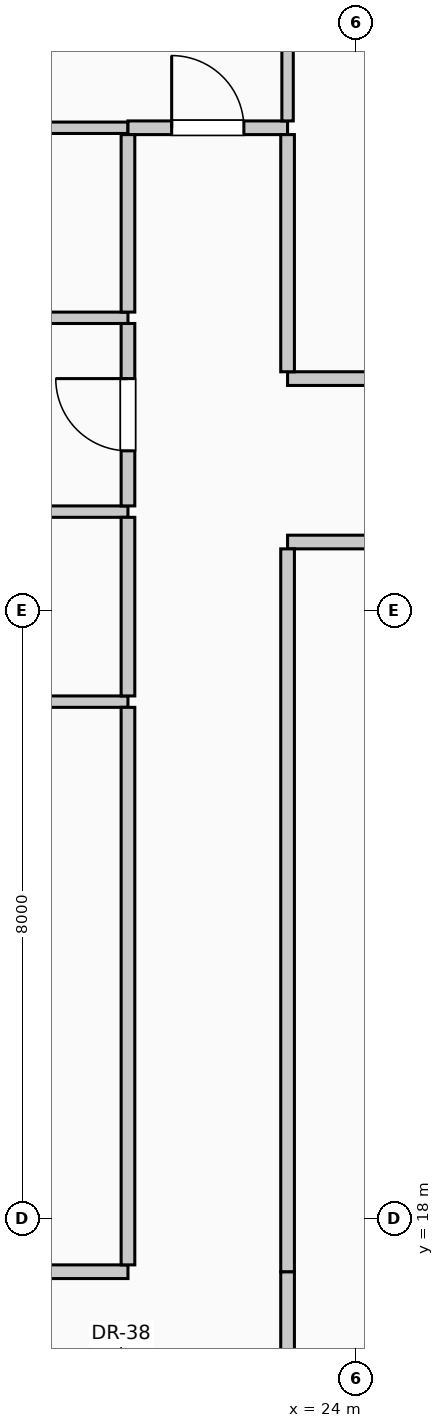
"""IFC4 building model, lengths in metres.
Left out: names, types, materials, properties, quantities, classifications, styles, units other than length and angle.
Written with IfcOpenShell. Run it as: python <this file> out.ifc"""

import sys

from ifc_helpers import new_model, si_unit, direction, frame, frame_2d, origin, place, context, subcontext, project, spatial, rectangle, extrude, element, fill, save


model = new_model("IFC4")
c1 = context("Model", 3, precision=1e-05, world=origin(), true_north=direction((0.0, 1.0)))
c2 = subcontext(c1, "Body", "Model", "MODEL_VIEW")
j1 = project(units=[si_unit("LENGTHUNIT", "METRE"), si_unit("PLANEANGLEUNIT", "RADIAN")], contexts=[c1])
p1 = place(None, origin())
s1 = spatial("IfcSite", under=j1, at=p1, CompositionType="ELEMENT")
p2 = place(p1, origin())
s2 = spatial("IfcBuilding", under=s1, at=p2, CompositionType="ELEMENT")
p3 = place(p2, frame((0.0, 0.0, 248.6)))
s3 = spatial("IfcBuildingStorey", under=s2, at=p3, CompositionType="ELEMENT", Elevation=248.6)
p4 = place(p3, frame((15.85, 17.3, 0.0), z_axis=(0.0, 0.0, 1.0), x_axis=(1.0, 0.0, 0.0)))
e1 = element("IfcWall", 1, at=p4, inside=s3, PredefinedType="PARTITIONING", context=c2, shape_type="SweptSolid", body=[
    extrude(rectangle(XDim=5.15, YDim=0.18, at=frame_2d((2.575, 0.0))), origin(), (0.0, 0.0, 1.0), 3.75),
])
p5 = place(p4, frame((2.28, 0.0, 0.0)))
e2 = element("IfcOpeningElement", 2, at=p5, cuts=e1, PredefinedType="OPENING", context=c2, shape_type="SweptSolid", body=[
    extrude(rectangle(XDim=0.95, YDim=2.15, at=frame_2d((0.475, 1.075))), frame((0.0, 0.1, 0.0), z_axis=(0.0, -1.0, 0.0), x_axis=(1.0, 0.0, 0.0)), (0.0, 0.0, 1.0), 0.2),
])
p6 = place(p3, frame((15.85, 24.8, 0.0), z_axis=(0.0, 0.0, 1.0), x_axis=(1.0, 0.0, 0.0)))
e3 = element("IfcWall", 3, at=p6, inside=s3, PredefinedType="PARTITIONING", context=c2, shape_type="SweptSolid", body=[
    extrude(rectangle(XDim=5.15, YDim=0.15, at=frame_2d((2.575, 0.0))), origin(), (0.0, 0.0, 1.0), 3.75),
])
p7 = place(p3, frame((23.1, 26.9, 0.0), z_axis=(0.0, 0.0, 1.0), x_axis=(1.0, 0.0, 0.0)))
e4 = element("IfcWall", 4, at=p7, inside=s3, PredefinedType="PARTITIONING", context=c2, shape_type="SweptSolid", body=[
    extrude(rectangle(XDim=9.02, YDim=0.18, at=frame_2d((4.51, 0.0))), origin(), (0.0, 0.0, 1.0), 3.75),
])
p8 = place(p7, frame((4.035, 0.0, 0.0)))
e5 = element("IfcOpeningElement", 5, at=p8, cuts=e4, PredefinedType="OPENING", context=c2, shape_type="SweptSolid", body=[
    extrude(rectangle(XDim=0.95, YDim=2.15, at=frame_2d((0.475, 1.075))), frame((0.0, 0.1, 0.0), z_axis=(0.0, -1.0, 0.0), x_axis=(1.0, 0.0, 0.0)), (0.0, 0.0, 1.0), 0.2),
])
p9 = place(p3, frame((12.2, 27.3, 0.0), z_axis=(0.0, 0.0, 1.0), x_axis=(1.0, 0.0, 0.0)))
e6 = element("IfcWall", 6, at=p9, inside=s3, PredefinedType="PARTITIONING", context=c2, shape_type="SweptSolid", body=[
    extrude(rectangle(XDim=8.8, YDim=0.15, at=frame_2d((4.4, 0.0))), origin(), (0.0, 0.0, 1.0), 3.75),
])
p10 = place(p3, frame((23.1, 29.05, 0.0), z_axis=(0.0, 0.0, 1.0), x_axis=(1.0, 0.0, 0.0)))
e7 = element("IfcWall", 7, at=p10, inside=s3, PredefinedType="PARTITIONING", context=c2, shape_type="SweptSolid", body=[
    extrude(rectangle(XDim=7.33, YDim=0.18, at=frame_2d((3.665, 0.0))), origin(), (0.0, 0.0, 1.0), 3.75),
])
p11 = place(p10, frame((3.14, 0.0, 0.0)))
e8 = element("IfcOpeningElement", 8, at=p11, cuts=e7, PredefinedType="OPENING", context=c2, shape_type="SweptSolid", body=[
    extrude(rectangle(XDim=1.05, YDim=2.15, at=frame_2d((0.525, 1.075))), frame((0.0, 0.1, 0.0), z_axis=(0.0, -1.0, 0.0), x_axis=(1.0, 0.0, 0.0)), (0.0, 0.0, 1.0), 0.2),
])
p12 = place(p3, frame((12.33, 29.85, 0.0), z_axis=(0.0, 0.0, 1.0), x_axis=(1.0, 0.0, 0.0)))
e9 = element("IfcWall", 9, at=p12, inside=s3, PredefinedType="PARTITIONING", context=c2, shape_type="SweptSolid", body=[
    extrude(rectangle(XDim=8.67, YDim=0.15, at=frame_2d((4.335, 0.0))), origin(), (0.0, 0.0, 1.0), 3.75),
])
p13 = place(p3, frame((16.75, 32.35, 0.0), z_axis=(0.0, 0.0, 1.0), x_axis=(1.0, 0.0, 0.0)))
e10 = element("IfcWall", 10, at=p13, inside=s3, PredefinedType="PARTITIONING", context=c2, shape_type="SweptSolid", body=[
    extrude(rectangle(XDim=4.25, YDim=0.15, at=frame_2d((2.125, 0.0))), origin(), (0.0, 0.0, 1.0), 3.75),
])
p14 = place(p3, frame((21.0, 32.35, 0.0), z_axis=(0.0, 0.0, 1.0), x_axis=(1.0, 0.0, 0.0)))
e11 = element("IfcWall", 11, at=p14, inside=s3, PredefinedType="PARTITIONING", context=c2, shape_type="SweptSolid", body=[
    extrude(rectangle(XDim=2.1, YDim=0.18, at=frame_2d((1.05, 0.0))), origin(), (0.0, 0.0, 1.0), 3.75),
])
p15 = place(p14, frame((0.575, 0.0, 0.0)))
e12 = element("IfcOpeningElement", 12, at=p15, cuts=e11, PredefinedType="OPENING", context=c2, shape_type="SweptSolid", body=[
    extrude(rectangle(XDim=0.95, YDim=2.15, at=frame_2d((0.475, 1.075))), frame((0.0, 0.1, 0.0), z_axis=(0.0, -1.0, 0.0), x_axis=(1.0, 0.0, 0.0)), (0.0, 0.0, 1.0), 0.2),
])
p16 = place(p3, frame((21.0, 17.39, 0.0), z_axis=(0.0, 0.0, 1.0), x_axis=(0.0, 1.0, 0.0)))
e13 = element("IfcWall", 13, at=p16, inside=s3, PredefinedType="PARTITIONING", context=c2, shape_type="SweptSolid", body=[
    extrude(rectangle(XDim=7.335, YDim=0.18, at=frame_2d((3.667, 0.0))), origin(), (0.0, 0.0, 1.0), 3.75),
])
p17 = place(p3, frame((21.0, 24.875, 0.0), z_axis=(0.0, 0.0, 1.0), x_axis=(0.0, 1.0, 0.0)))
e14 = element("IfcWall", 14, at=p17, inside=s3, PredefinedType="PARTITIONING", context=c2, shape_type="SweptSolid", body=[
    extrude(rectangle(XDim=2.35, YDim=0.18, at=frame_2d((1.175, 0.0))), origin(), (0.0, 0.0, 1.0), 3.75),
])
p18 = place(p3, frame((21.0, 27.375, 0.0), z_axis=(0.0, 0.0, 1.0), x_axis=(0.0, 1.0, 0.0)))
e15 = element("IfcWall", 15, at=p18, inside=s3, PredefinedType="PARTITIONING", context=c2, shape_type="SweptSolid", body=[
    extrude(rectangle(XDim=2.4, YDim=0.18, at=frame_2d((1.2, 0.0))), origin(), (0.0, 0.0, 1.0), 3.75),
])
p19 = place(p18, frame((0.725, 0.0, 0.0)))
e16 = element("IfcOpeningElement", 16, at=p19, cuts=e15, PredefinedType="OPENING", context=c2, shape_type="SweptSolid", body=[
    extrude(rectangle(XDim=0.95, YDim=2.15, at=frame_2d((0.475, 1.075))), frame((0.0, 0.1, 0.0), z_axis=(0.0, -1.0, 0.0), x_axis=(1.0, 0.0, 0.0)), (0.0, 0.0, 1.0), 0.2),
])
p20 = place(p3, frame((21.0, 29.925, 0.0), z_axis=(0.0, 0.0, 1.0), x_axis=(0.0, 1.0, 0.0)))
e17 = element("IfcWall", 17, at=p20, inside=s3, PredefinedType="PARTITIONING", context=c2, shape_type="SweptSolid", body=[
    extrude(rectangle(XDim=2.335, YDim=0.18, at=frame_2d((1.167, 0.0))), origin(), (0.0, 0.0, 1.0), 3.75),
])
p21 = place(p3, frame((23.1, 15.29, 0.0), z_axis=(0.0, 0.0, 1.0), x_axis=(0.0, 1.0, 0.0)))
e18 = element("IfcWall", 18, at=p21, inside=s3, PredefinedType="PARTITIONING", context=c2, shape_type="SweptSolid", body=[
    extrude(rectangle(XDim=2.01, YDim=0.18, at=frame_2d((1.005, 0.0))), origin(), (0.0, 0.0, 1.0), 3.75),
])
p22 = place(p3, frame((23.1, 17.3, 0.0), z_axis=(0.0, 0.0, 1.0), x_axis=(0.0, 1.0, 0.0)))
e19 = element("IfcWall", 19, at=p22, inside=s3, PredefinedType="PARTITIONING", context=c2, shape_type="SweptSolid", body=[
    extrude(rectangle(XDim=9.51, YDim=0.18, at=frame_2d((4.755, 0.0))), origin(), (0.0, 0.0, 1.0), 3.75),
])
p23 = place(p3, frame((23.1, 29.14, 0.0), z_axis=(0.0, 0.0, 1.0), x_axis=(0.0, 1.0, 0.0)))
e20 = element("IfcWall", 20, at=p23, inside=s3, PredefinedType="PARTITIONING", context=c2, shape_type="SweptSolid", body=[
    extrude(rectangle(XDim=3.12, YDim=0.18, at=frame_2d((1.56, 0.0))), origin(), (0.0, 0.0, 1.0), 3.75),
])
p24 = place(p3, frame((23.1, 32.44, 0.0), z_axis=(0.0, 0.0, 1.0), x_axis=(0.0, 1.0, 0.0)))
e21 = element("IfcWall", 21, at=p24, inside=s3, PredefinedType="PARTITIONING", context=c2, shape_type="SweptSolid", body=[
    extrude(rectangle(XDim=12.84, YDim=0.15, at=frame_2d((6.42, 0.0))), origin(), (0.0, 0.0, 1.0), 3.75),
])
p25 = place(p15, origin())
e22 = element("IfcDoor", 22, at=p25, inside=s3, OperationType="SINGLE_SWING_LEFT", PredefinedType="DOOR", context=c2, shape_type="SweptSolid", body=[
    extrude(rectangle(XDim=0.95, YDim=2.15, at=frame_2d((0.475, 1.075))), frame((0.0, 0.025, 0.0), z_axis=(0.0, -1.0, 0.0), x_axis=(1.0, 0.0, 0.0)), (0.0, 0.0, 1.0), 0.05),
])
fill(e12, e22)
p26 = place(p19, origin())
e23 = element("IfcDoor", 23, at=p26, inside=s3, OperationType="SINGLE_SWING_RIGHT", PredefinedType="DOOR", context=c2, shape_type="SweptSolid", body=[
    extrude(rectangle(XDim=0.95, YDim=2.15, at=frame_2d((0.475, 1.075))), frame((0.0, 0.025, 0.0), z_axis=(0.0, -1.0, 0.0), x_axis=(1.0, 0.0, 0.0)), (0.0, 0.0, 1.0), 0.05),
])
fill(e16, e23)
save(model, sys.argv[1])
